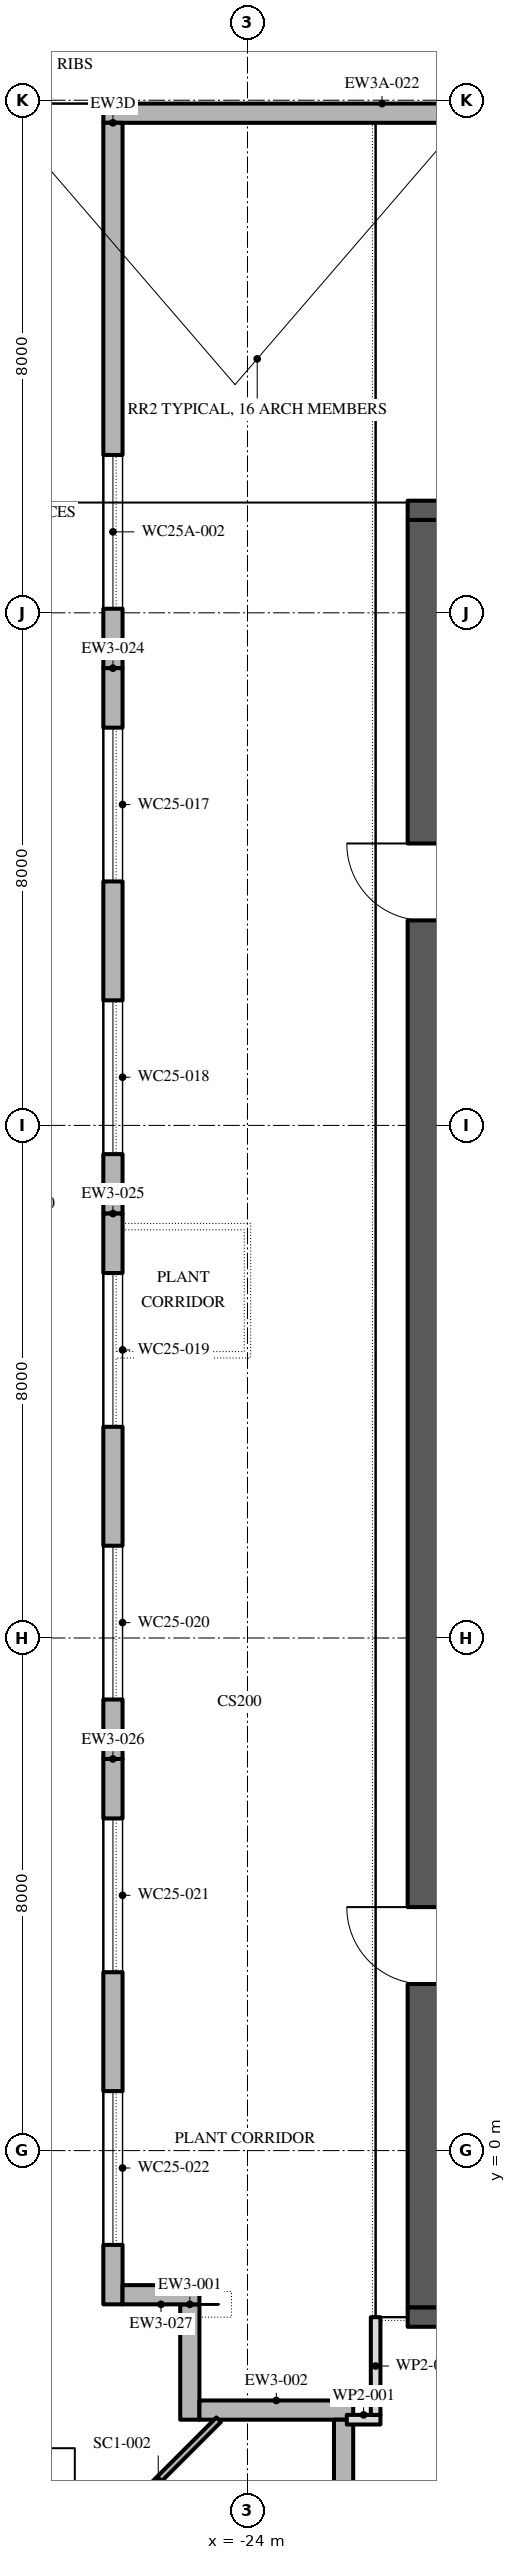
"""IFC4 building model, lengths in metres.
Left out: names, types, materials, properties, quantities, classifications, styles, units other than length and angle.
Written with IfcOpenShell. Run it as: python <this file> out.ifc"""

import sys

from ifc_helpers import new_model, si_unit, direction, frame, frame_2d, origin, place, context, subcontext, project, spatial, polyline, rectangle, outline, extrude, element, fill, save


model = new_model("IFC4")
c1 = context("Model", 3, precision=1e-05, world=origin(), true_north=direction((0.0, 1.0)))
c2 = subcontext(c1, "Body", "Model", "MODEL_VIEW")
j1 = project(units=[si_unit("LENGTHUNIT", "METRE"), si_unit("PLANEANGLEUNIT", "RADIAN")], contexts=[c1])
p1 = place(None, origin())
s1 = spatial("IfcSite", under=j1, at=p1, CompositionType="ELEMENT")
p2 = place(p1, origin())
s2 = spatial("IfcBuilding", under=s1, at=p2, CompositionType="ELEMENT")
p3 = place(p2, frame((0.0, 0.0, 385.8)))
s3 = spatial("IfcBuildingStorey", under=s2, at=p3, CompositionType="ELEMENT", Elevation=385.8)
p4 = place(p3, frame((-24.9, -2.4, 0.0), z_axis=(0.0, 0.0, 1.0), x_axis=(0.0, -1.0, 0.0)))
e1 = element("IfcWall", 1, at=p4, inside=s3, PredefinedType="STANDARD", context=c2, shape_type="SweptSolid", body=[
    extrude(rectangle(XDim=1.8, YDim=0.3, at=frame_2d((0.9, 0.0))), origin(), (0.0, 0.0, 1.0), 4.0),
])
p5 = place(p3, frame((-24.75, -4.05, 0.0), z_axis=(0.0, 0.0, 1.0), x_axis=(1.0, 0.0, 0.0)))
e2 = element("IfcWall", 2, at=p5, inside=s3, PredefinedType="STANDARD", context=c2, shape_type="SweptSolid", body=[
    extrude(rectangle(XDim=2.4, YDim=0.3, at=frame_2d((1.2, 0.0))), origin(), (0.0, 0.0, 1.0), 4.0),
])
p6 = place(p3, frame((-22.5, -4.2, 0.0), z_axis=(0.0, 0.0, 1.0), x_axis=(0.0, -1.0, 0.0)))
e3 = element("IfcWall", 3, at=p6, inside=s3, PredefinedType="STANDARD", context=c2, shape_type="SweptSolid", body=[
    extrude(rectangle(XDim=1.8, YDim=0.3, at=frame_2d((0.9, 0.0))), origin(), (0.0, 0.0, 1.0), 4.0),
])
p7 = place(p3, frame((-17.55, 31.798, 0.0), z_axis=(0.0, 0.0, 1.0), x_axis=(-1.0, 0.0, 0.0)))
e4 = element("IfcWall", 4, at=p7, inside=s3, PredefinedType="STANDARD", context=c2, shape_type="SweptSolid", body=[
    extrude(rectangle(XDim=8.7, YDim=0.3, at=frame_2d((4.35, 0.0))), origin(), (0.0, 0.0, 1.0), 2.199),
])
p8 = place(p3, frame((-26.1, 31.648, 0.0), z_axis=(0.0, 0.0, 1.0), x_axis=(0.0, -1.0, 0.0)))
e5 = element("IfcWall", 5, at=p8, inside=s3, PredefinedType="STANDARD", context=c2, shape_type="SweptSolid", body=[
    extrude(outline(polyline([(0.0, 0.0), (8.512, 0.0), (8.512, 4.0), (5.927, 4.0), (5.927, 6.298), (5.907, 6.285), (2.519, 4.0), (0.0, 2.301), (0.0, 0.0)])), frame((0.0, 0.15, 0.0), z_axis=(0.0, -1.0, 0.0), x_axis=(1.0, 0.0, 0.0)), (0.0, 0.0, 1.0), 0.3),
])
p9 = place(p8, frame((5.184, 0.0, 0.8)))
e6 = element("IfcOpeningElement", 6, at=p9, cuts=e5, PredefinedType="OPENING", context=c2, shape_type="SweptSolid", body=[
    extrude(outline(polyline([(0.0, 0.0), (2.4, 0.0), (2.4, 0.85), (2.377, 1.088), (2.31, 1.317), (2.2, 1.529), (2.051, 1.717), (1.87, 1.872), (1.663, 1.991), (1.437, 2.068), (1.2, 2.1), (0.963, 2.068), (0.737, 1.991), (0.53, 1.872), (0.349, 1.717), (0.2, 1.529), (0.09, 1.317), (0.023, 1.088), (0.0, 0.85), (0.0, 0.0)])), frame((0.0, 0.16, 0.0), z_axis=(0.0, -1.0, 0.0), x_axis=(1.0, 0.0, 0.0)), (0.0, 0.0, 1.0), 0.32),
])
p10 = place(p3, frame((-26.1, 23.136, 0.0), z_axis=(0.0, 0.0, 1.0), x_axis=(0.0, -1.0, 0.0)))
e7 = element("IfcWall", 7, at=p10, inside=s3, PredefinedType="STANDARD", context=c2, shape_type="SweptSolid", body=[
    extrude(rectangle(XDim=8.512, YDim=0.3, at=frame_2d((4.256, 0.0))), origin(), (0.0, 0.0, 1.0), 4.0),
])
p11 = place(p10, frame((0.928, 0.0, 0.8)))
e8 = element("IfcOpeningElement", 8, at=p11, cuts=e7, PredefinedType="OPENING", context=c2, shape_type="SweptSolid", body=[
    extrude(outline(polyline([(0.0, 0.0), (2.4, 0.0), (2.4, 1.25), (2.377, 1.488), (2.31, 1.717), (2.2, 1.929), (2.051, 2.116), (1.87, 2.272), (1.663, 2.391), (1.437, 2.468), (1.2, 2.5), (0.963, 2.468), (0.737, 2.391), (0.53, 2.272), (0.349, 2.116), (0.2, 1.929), (0.09, 1.717), (0.023, 1.488), (0.0, 1.25), (0.0, 0.0)])), frame((0.0, 0.16, 0.0), z_axis=(0.0, -1.0, 0.0), x_axis=(1.0, 0.0, 0.0)), (0.0, 0.0, 1.0), 0.32),
])
p12 = place(p10, frame((5.184, 0.0, 0.8)))
e9 = element("IfcOpeningElement", 9, at=p12, cuts=e7, PredefinedType="OPENING", context=c2, shape_type="SweptSolid", body=[
    extrude(outline(polyline([(0.0, 0.0), (2.4, 0.0), (2.4, 1.25), (2.377, 1.488), (2.31, 1.717), (2.2, 1.929), (2.051, 2.116), (1.87, 2.272), (1.663, 2.391), (1.437, 2.468), (1.2, 2.5), (0.963, 2.468), (0.737, 2.391), (0.53, 2.272), (0.349, 2.116), (0.2, 1.929), (0.09, 1.717), (0.023, 1.488), (0.0, 1.25), (0.0, 0.0)])), frame((0.0, 0.16, 0.0), z_axis=(0.0, -1.0, 0.0), x_axis=(1.0, 0.0, 0.0)), (0.0, 0.0, 1.0), 0.32),
])
p13 = place(p3, frame((-26.1, 14.624, 0.0), z_axis=(0.0, 0.0, 1.0), x_axis=(0.0, -1.0, 0.0)))
e10 = element("IfcWall", 10, at=p13, inside=s3, PredefinedType="STANDARD", context=c2, shape_type="SweptSolid", body=[
    extrude(rectangle(XDim=8.512, YDim=0.3, at=frame_2d((4.256, 0.0))), origin(), (0.0, 0.0, 1.0), 4.0),
])
p14 = place(p13, frame((0.928, 0.0, 0.8)))
e11 = element("IfcOpeningElement", 11, at=p14, cuts=e10, PredefinedType="OPENING", context=c2, shape_type="SweptSolid", body=[
    extrude(outline(polyline([(0.0, 0.0), (2.4, 0.0), (2.4, 1.25), (2.377, 1.488), (2.31, 1.717), (2.2, 1.929), (2.051, 2.116), (1.87, 2.272), (1.663, 2.391), (1.437, 2.468), (1.2, 2.5), (0.963, 2.468), (0.737, 2.391), (0.53, 2.272), (0.349, 2.116), (0.2, 1.929), (0.09, 1.717), (0.023, 1.488), (0.0, 1.25), (0.0, 0.0)])), frame((0.0, 0.16, 0.0), z_axis=(0.0, -1.0, 0.0), x_axis=(1.0, 0.0, 0.0)), (0.0, 0.0, 1.0), 0.32),
])
p15 = place(p13, frame((5.184, 0.0, 0.8)))
e12 = element("IfcOpeningElement", 12, at=p15, cuts=e10, PredefinedType="OPENING", context=c2, shape_type="SweptSolid", body=[
    extrude(outline(polyline([(0.0, 0.0), (2.4, 0.0), (2.4, 1.25), (2.377, 1.488), (2.31, 1.717), (2.2, 1.929), (2.051, 2.116), (1.87, 2.272), (1.663, 2.391), (1.437, 2.468), (1.2, 2.5), (0.963, 2.468), (0.737, 2.391), (0.53, 2.272), (0.349, 2.116), (0.2, 1.929), (0.09, 1.717), (0.023, 1.488), (0.0, 1.25), (0.0, 0.0)])), frame((0.0, 0.16, 0.0), z_axis=(0.0, -1.0, 0.0), x_axis=(1.0, 0.0, 0.0)), (0.0, 0.0, 1.0), 0.32),
])
p16 = place(p3, frame((-26.1, 6.112, 0.0), z_axis=(0.0, 0.0, 1.0), x_axis=(0.0, -1.0, 0.0)))
e13 = element("IfcWall", 13, at=p16, inside=s3, PredefinedType="STANDARD", context=c2, shape_type="SweptSolid", body=[
    extrude(rectangle(XDim=8.512, YDim=0.3, at=frame_2d((4.256, 0.0))), origin(), (0.0, 0.0, 1.0), 4.0),
])
p17 = place(p16, frame((0.928, 0.0, 0.8)))
e14 = element("IfcOpeningElement", 14, at=p17, cuts=e13, PredefinedType="OPENING", context=c2, shape_type="SweptSolid", body=[
    extrude(outline(polyline([(0.0, 0.0), (2.4, 0.0), (2.4, 1.25), (2.377, 1.488), (2.31, 1.717), (2.2, 1.929), (2.051, 2.116), (1.87, 2.272), (1.663, 2.391), (1.437, 2.468), (1.2, 2.5), (0.963, 2.468), (0.737, 2.391), (0.53, 2.272), (0.349, 2.116), (0.2, 1.929), (0.09, 1.717), (0.023, 1.488), (0.0, 1.25), (0.0, 0.0)])), frame((0.0, 0.16, 0.0), z_axis=(0.0, -1.0, 0.0), x_axis=(1.0, 0.0, 0.0)), (0.0, 0.0, 1.0), 0.32),
])
p18 = place(p16, frame((5.184, 0.0, 0.8)))
e15 = element("IfcOpeningElement", 15, at=p18, cuts=e13, PredefinedType="OPENING", context=c2, shape_type="SweptSolid", body=[
    extrude(outline(polyline([(0.0, 0.0), (2.4, 0.0), (2.4, 1.25), (2.377, 1.488), (2.31, 1.717), (2.2, 1.929), (2.051, 2.116), (1.87, 2.272), (1.663, 2.391), (1.437, 2.468), (1.2, 2.5), (0.963, 2.468), (0.737, 2.391), (0.53, 2.272), (0.349, 2.116), (0.2, 1.929), (0.09, 1.717), (0.023, 1.488), (0.0, 1.25), (0.0, 0.0)])), frame((0.0, 0.16, 0.0), z_axis=(0.0, -1.0, 0.0), x_axis=(1.0, 0.0, 0.0)), (0.0, 0.0, 1.0), 0.32),
])
p19 = place(p3, frame((-25.95, -2.25, 0.0), z_axis=(0.0, 0.0, 1.0), x_axis=(1.0, 0.0, 0.0)))
e16 = element("IfcWall", 16, at=p19, inside=s3, PredefinedType="STANDARD", context=c2, shape_type="SweptSolid", body=[
    extrude(rectangle(XDim=1.2, YDim=0.3, at=frame_2d((0.6, 0.0))), origin(), (0.0, 0.0, 1.0), 4.0),
])
p20 = place(p3, frame((-24.45, -4.2, -0.05), z_axis=(0.0, 0.0, 1.0), x_axis=(-0.707106781187, -0.707106781187, 0.0)))
e17 = element("IfcWall", 17, at=p20, inside=s3, PredefinedType="STANDARD", context=c2, shape_type="SweptSolid", body=[
    extrude(rectangle(XDim=2.667, YDim=0.1, at=frame_2d((1.333, 0.0))), origin(), (0.0, 0.0, 1.0), 4.05),
])
p21 = place(p3, frame((-21.25, -2.45, 0.0), z_axis=(0.0, 0.0, 1.0), x_axis=(0.0, 1.0, 0.0)))
e18 = element("IfcWall", 18, at=p21, inside=s3, PredefinedType="SHEAR", context=c2, shape_type="SweptSolid", body=[
    extrude(rectangle(XDim=27.9, YDim=0.5, at=frame_2d((13.95, 0.0))), origin(), (0.0, 0.0, 1.0), 4.0),
])
p22 = place(p21, frame((5.05, 0.0, 0.0)))
e19 = element("IfcOpeningElement", 19, at=p22, cuts=e18, PredefinedType="OPENING", context=c2, shape_type="SweptSolid", body=[
    extrude(rectangle(XDim=1.2, YDim=2.1, at=frame_2d((0.6, 1.05))), frame((0.0, 0.26, 0.0), z_axis=(0.0, -1.0, 0.0), x_axis=(1.0, 0.0, 0.0)), (0.0, 0.0, 1.0), 0.52),
])
p23 = place(p21, frame((21.65, 0.0, 0.0)))
e20 = element("IfcOpeningElement", 20, at=p23, cuts=e18, PredefinedType="OPENING", context=c2, shape_type="SweptSolid", body=[
    extrude(rectangle(XDim=1.2, YDim=2.1, at=frame_2d((0.6, 1.05))), frame((0.0, 0.26, 0.0), z_axis=(0.0, -1.0, 0.0), x_axis=(1.0, 0.0, 0.0)), (0.0, 0.0, 1.0), 0.52),
])
for number, where, z_axis, x_axis in (
    (21, (-21.5, -2.6, 0.0), (0.0, 0.0, 1.0), (1.0, 0.0, 0.0)),
    (22, (-21.5, 25.6, 0.0), (0.0, 0.0, 1.0), (1.0, 0.0, 0.0)),
):
    element("IfcWall", number, at=place(p3, frame(where, z_axis=z_axis, x_axis=x_axis)), inside=s3, PredefinedType="SHEAR", context=c2, shape_type="SweptSolid", body=[
        extrude(rectangle(XDim=11.0, YDim=0.3, at=frame_2d((5.5, 0.0))), origin(), (0.0, 0.0, 1.0), 4.0),
    ])
p24 = place(p3, frame((-21.925, -4.2, 0.0), z_axis=(0.0, 0.0, 1.0), x_axis=(-1.0, 0.0, 0.0)))
e23 = element("IfcWall", 23, at=p24, inside=s3, PredefinedType="PARTITIONING", context=c2, shape_type="SweptSolid", body=[
    extrude(rectangle(XDim=0.525, YDim=0.15, at=frame_2d((0.262, 0.0))), origin(), (0.0, 0.0, 1.0), 4.0),
])
p25 = place(p3, frame((-22.0, -2.6, 0.0), z_axis=(0.0, 0.0, 1.0), x_axis=(0.0, -1.0, 0.0)))
e24 = element("IfcWall", 24, at=p25, inside=s3, PredefinedType="PARTITIONING", context=c2, shape_type="SweptSolid", body=[
    extrude(rectangle(XDim=1.525, YDim=0.15, at=frame_2d((0.762, 0.0))), origin(), (0.0, 0.0, 1.0), 4.0),
])
p26 = place(p9, origin())
e25 = element("IfcWindow", 25, at=p26, inside=s3, PartitioningType="DOUBLE_PANEL_VERTICAL", PredefinedType="WINDOW", context=c2, shape_type="SweptSolid", body=[
    extrude(outline(polyline([(0.0, 0.0), (2.4, 0.0), (2.4, 0.85), (2.377, 1.088), (2.31, 1.317), (2.2, 1.529), (2.051, 1.717), (1.87, 1.872), (1.663, 1.991), (1.437, 2.068), (1.2, 2.1), (0.963, 2.068), (0.737, 1.991), (0.53, 1.872), (0.349, 1.717), (0.2, 1.529), (0.09, 1.317), (0.023, 1.088), (0.0, 0.85), (0.0, 0.0)])), frame((0.0, 0.03, 0.0), z_axis=(0.0, -1.0, 0.0), x_axis=(1.0, 0.0, 0.0)), (0.0, 0.0, 1.0), 0.06),
])
fill(e6, e25)
p27 = place(p11, origin())
e26 = element("IfcWindow", 26, at=p27, inside=s3, PartitioningType="DOUBLE_PANEL_VERTICAL", PredefinedType="WINDOW", context=c2, shape_type="SweptSolid", body=[
    extrude(outline(polyline([(0.0, 0.0), (2.4, 0.0), (2.4, 1.25), (2.377, 1.488), (2.31, 1.717), (2.2, 1.929), (2.051, 2.116), (1.87, 2.272), (1.663, 2.391), (1.437, 2.468), (1.2, 2.5), (0.963, 2.468), (0.737, 2.391), (0.53, 2.272), (0.349, 2.116), (0.2, 1.929), (0.09, 1.717), (0.023, 1.488), (0.0, 1.25), (0.0, 0.0)])), frame((0.0, 0.03, 0.0), z_axis=(0.0, -1.0, 0.0), x_axis=(1.0, 0.0, 0.0)), (0.0, 0.0, 1.0), 0.06),
])
fill(e8, e26)
p28 = place(p12, origin())
e27 = element("IfcWindow", 27, at=p28, inside=s3, PartitioningType="DOUBLE_PANEL_VERTICAL", PredefinedType="WINDOW", context=c2, shape_type="SweptSolid", body=[
    extrude(outline(polyline([(0.0, 0.0), (2.4, 0.0), (2.4, 1.25), (2.377, 1.488), (2.31, 1.717), (2.2, 1.929), (2.051, 2.116), (1.87, 2.272), (1.663, 2.391), (1.437, 2.468), (1.2, 2.5), (0.963, 2.468), (0.737, 2.391), (0.53, 2.272), (0.349, 2.116), (0.2, 1.929), (0.09, 1.717), (0.023, 1.488), (0.0, 1.25), (0.0, 0.0)])), frame((0.0, 0.03, 0.0), z_axis=(0.0, -1.0, 0.0), x_axis=(1.0, 0.0, 0.0)), (0.0, 0.0, 1.0), 0.06),
])
fill(e9, e27)
p29 = place(p14, origin())
e28 = element("IfcWindow", 28, at=p29, inside=s3, PartitioningType="DOUBLE_PANEL_VERTICAL", PredefinedType="WINDOW", context=c2, shape_type="SweptSolid", body=[
    extrude(outline(polyline([(0.0, 0.0), (2.4, 0.0), (2.4, 1.25), (2.377, 1.488), (2.31, 1.717), (2.2, 1.929), (2.051, 2.116), (1.87, 2.272), (1.663, 2.391), (1.437, 2.468), (1.2, 2.5), (0.963, 2.468), (0.737, 2.391), (0.53, 2.272), (0.349, 2.116), (0.2, 1.929), (0.09, 1.717), (0.023, 1.488), (0.0, 1.25), (0.0, 0.0)])), frame((0.0, 0.03, 0.0), z_axis=(0.0, -1.0, 0.0), x_axis=(1.0, 0.0, 0.0)), (0.0, 0.0, 1.0), 0.06),
])
fill(e11, e28)
p30 = place(p15, origin())
e29 = element("IfcWindow", 29, at=p30, inside=s3, PartitioningType="DOUBLE_PANEL_VERTICAL", PredefinedType="WINDOW", context=c2, shape_type="SweptSolid", body=[
    extrude(outline(polyline([(0.0, 0.0), (2.4, 0.0), (2.4, 1.25), (2.377, 1.488), (2.31, 1.717), (2.2, 1.929), (2.051, 2.116), (1.87, 2.272), (1.663, 2.391), (1.437, 2.468), (1.2, 2.5), (0.963, 2.468), (0.737, 2.391), (0.53, 2.272), (0.349, 2.116), (0.2, 1.929), (0.09, 1.717), (0.023, 1.488), (0.0, 1.25), (0.0, 0.0)])), frame((0.0, 0.03, 0.0), z_axis=(0.0, -1.0, 0.0), x_axis=(1.0, 0.0, 0.0)), (0.0, 0.0, 1.0), 0.06),
])
fill(e12, e29)
p31 = place(p17, origin())
e30 = element("IfcWindow", 30, at=p31, inside=s3, PartitioningType="DOUBLE_PANEL_VERTICAL", PredefinedType="WINDOW", context=c2, shape_type="SweptSolid", body=[
    extrude(outline(polyline([(0.0, 0.0), (2.4, 0.0), (2.4, 1.25), (2.377, 1.488), (2.31, 1.717), (2.2, 1.929), (2.051, 2.116), (1.87, 2.272), (1.663, 2.391), (1.437, 2.468), (1.2, 2.5), (0.963, 2.468), (0.737, 2.391), (0.53, 2.272), (0.349, 2.116), (0.2, 1.929), (0.09, 1.717), (0.023, 1.488), (0.0, 1.25), (0.0, 0.0)])), frame((0.0, 0.03, 0.0), z_axis=(0.0, -1.0, 0.0), x_axis=(1.0, 0.0, 0.0)), (0.0, 0.0, 1.0), 0.06),
])
fill(e14, e30)
p32 = place(p18, origin())
e31 = element("IfcWindow", 31, at=p32, inside=s3, PartitioningType="DOUBLE_PANEL_VERTICAL", PredefinedType="WINDOW", context=c2, shape_type="SweptSolid", body=[
    extrude(outline(polyline([(0.0, 0.0), (2.4, 0.0), (2.4, 1.25), (2.377, 1.488), (2.31, 1.717), (2.2, 1.929), (2.051, 2.116), (1.87, 2.272), (1.663, 2.391), (1.437, 2.468), (1.2, 2.5), (0.963, 2.468), (0.737, 2.391), (0.53, 2.272), (0.349, 2.116), (0.2, 1.929), (0.09, 1.717), (0.023, 1.488), (0.0, 1.25), (0.0, 0.0)])), frame((0.0, 0.03, 0.0), z_axis=(0.0, -1.0, 0.0), x_axis=(1.0, 0.0, 0.0)), (0.0, 0.0, 1.0), 0.06),
])
fill(e15, e31)
p33 = place(p22, origin())
e32 = element("IfcDoor", 32, at=p33, inside=s3, OperationType="SINGLE_SWING_LEFT", PredefinedType="DOOR", context=c2, shape_type="SweptSolid", body=[
    extrude(rectangle(XDim=1.2, YDim=2.1, at=frame_2d((0.6, 1.05))), frame((0.0, 0.025, 0.0), z_axis=(0.0, -1.0, 0.0), x_axis=(1.0, 0.0, 0.0)), (0.0, 0.0, 1.0), 0.05),
])
fill(e19, e32)
p34 = place(p23, origin())
e33 = element("IfcDoor", 33, at=p34, inside=s3, OperationType="SINGLE_SWING_LEFT", PredefinedType="DOOR", context=c2, shape_type="SweptSolid", body=[
    extrude(rectangle(XDim=1.2, YDim=2.1, at=frame_2d((0.6, 1.05))), frame((0.0, 0.025, 0.0), z_axis=(0.0, -1.0, 0.0), x_axis=(1.0, 0.0, 0.0)), (0.0, 0.0, 1.0), 0.05),
])
fill(e20, e33)
save(model, sys.argv[1])
